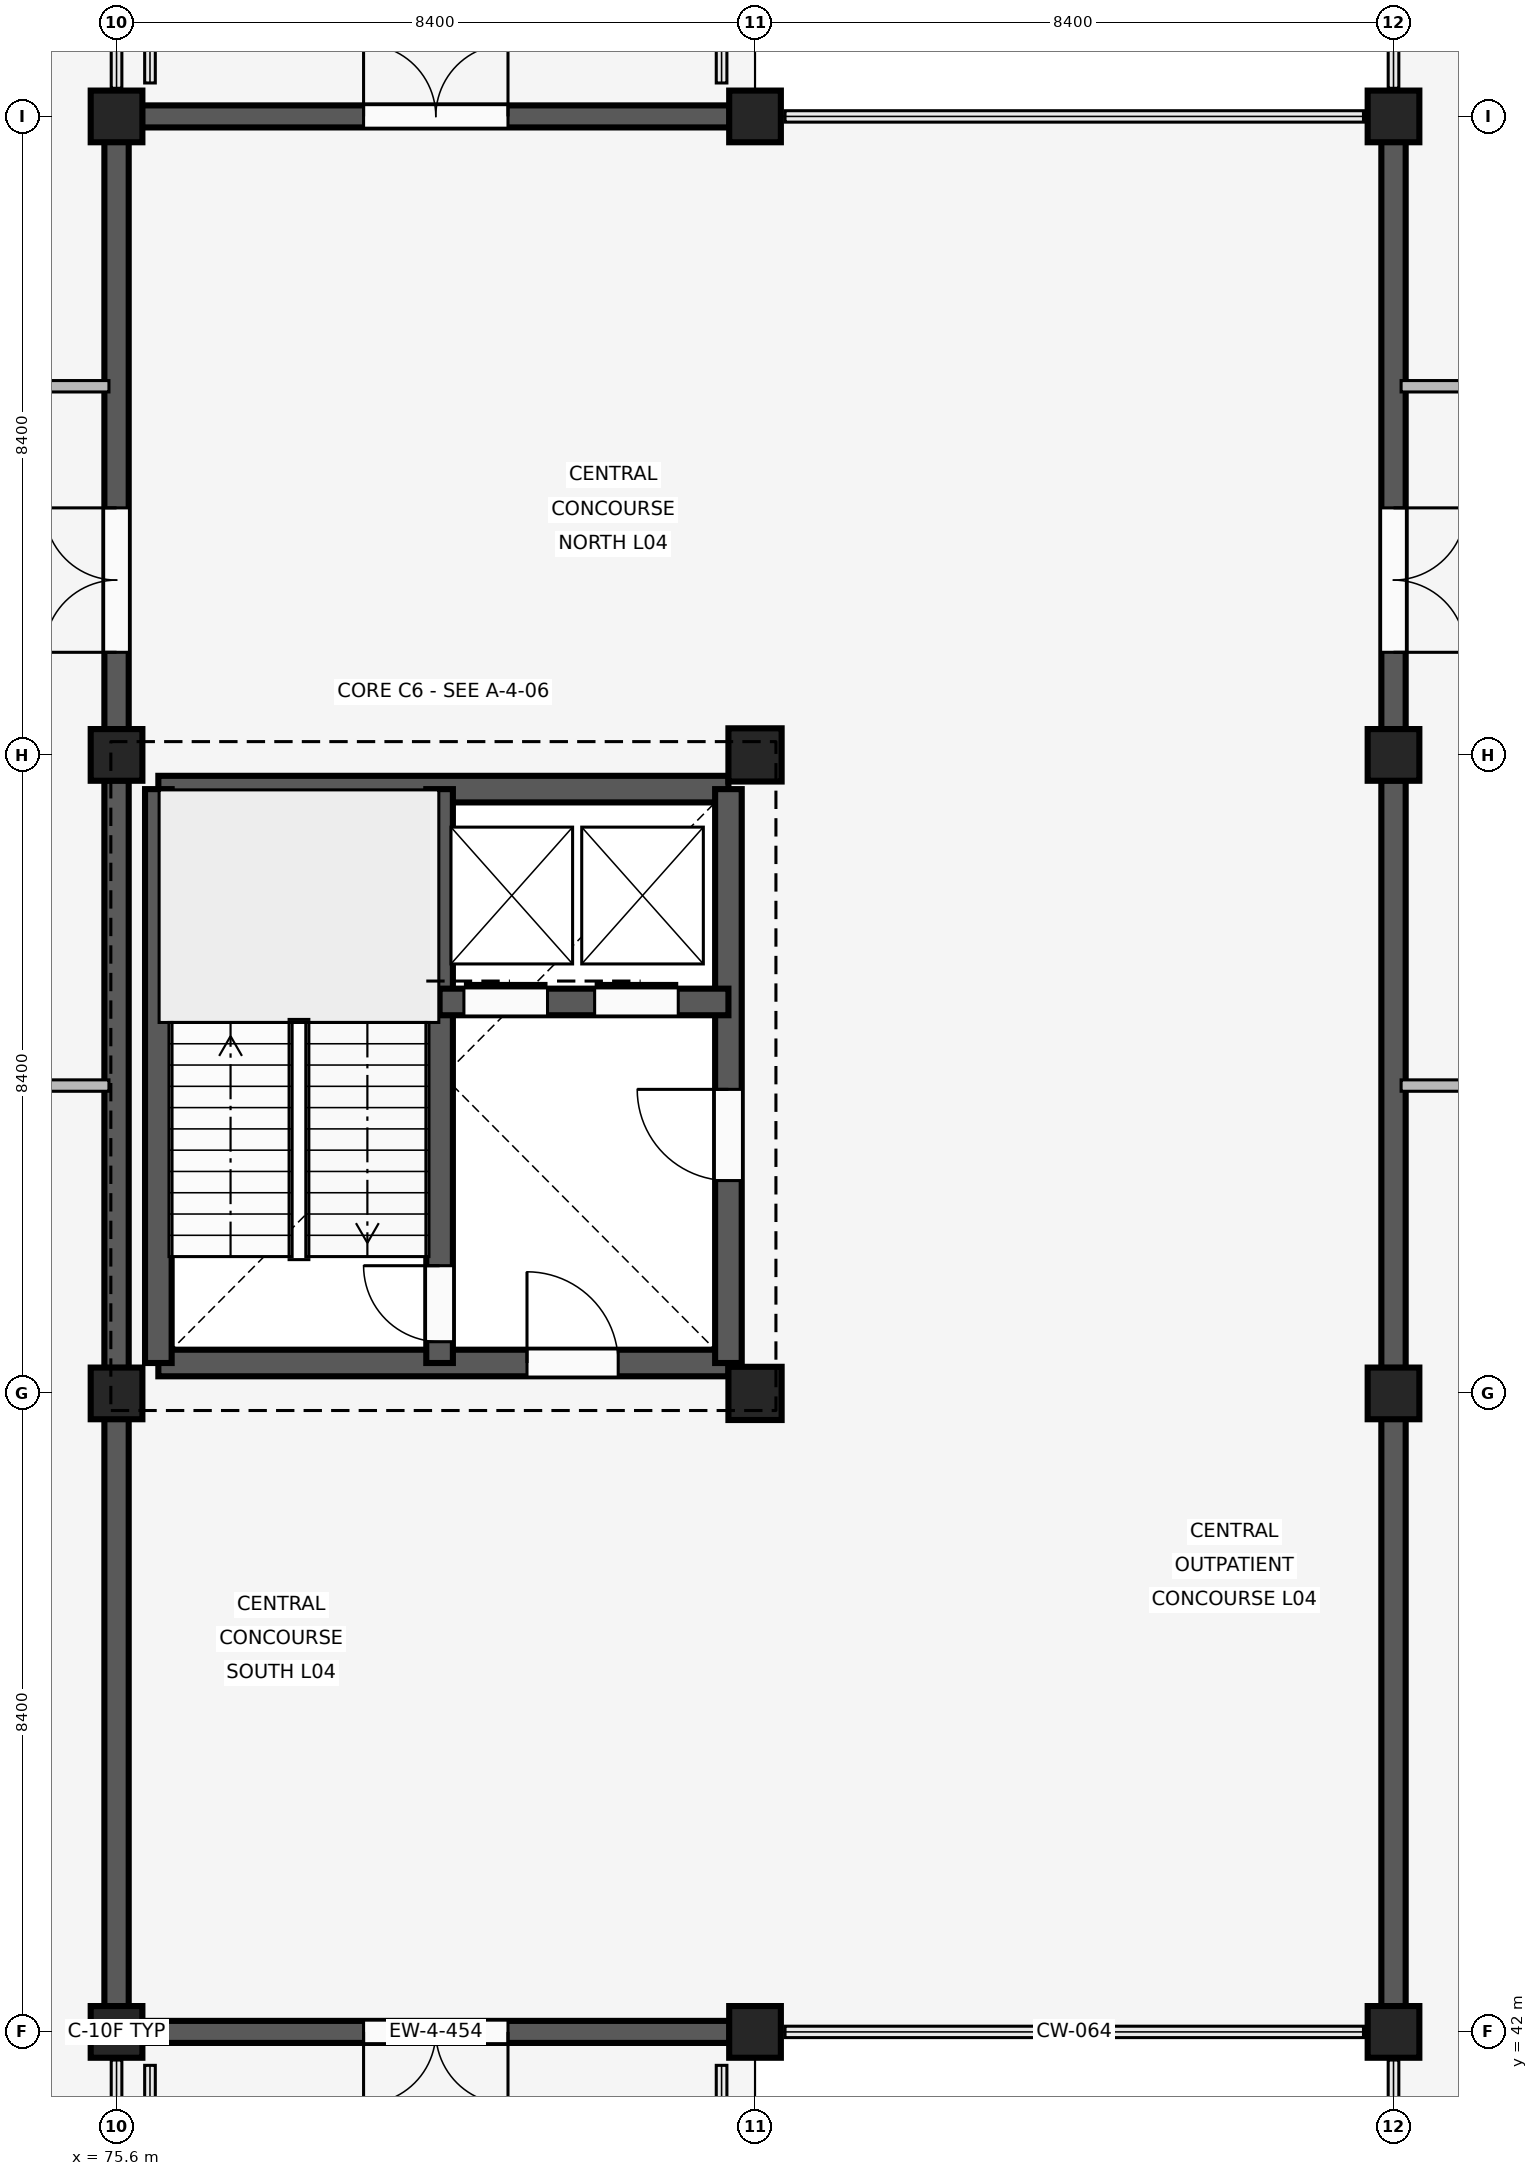
"""IFC4 building model, lengths in metres.
Left out: names, types, materials, properties, quantities, classifications, styles, units other than length and angle.
Written with IfcOpenShell. Run it as: python <this file> out.ifc"""

import sys

from ifc_helpers import new_model, si_unit, direction, frame, frame_2d, origin, origin_2d, place, context, subcontext, project, spatial, rectangle, extrude, element, fill, save


model = new_model("IFC4")
c1 = context("Model", 3, precision=1e-05, world=origin(), true_north=direction((0.0, 1.0)))
c2 = subcontext(c1, "Body", "Model", "MODEL_VIEW")
j1 = project(units=[si_unit("LENGTHUNIT", "METRE"), si_unit("PLANEANGLEUNIT", "RADIAN")], contexts=[c1])
p1 = place(None, origin())
s1 = spatial("IfcSite", under=j1, at=p1, CompositionType="ELEMENT")
p2 = place(p1, origin())
s2 = spatial("IfcBuilding", under=s1, at=p2, CompositionType="ELEMENT")
p3 = place(p2, frame((0.0, 0.0, 16.2)))
s3 = spatial("IfcBuildingStorey", under=s2, at=p3, CompositionType="ELEMENT", Elevation=16.2)
for number, where, z_axis, x_axis in (
    (1, (75.6, 42.0, 0.0), (0.0, 0.0, 1.0), (1.0, 0.0, 0.0)),
    (2, (75.6, 50.4, 0.0), (0.0, 0.0, 1.0), (1.0, 0.0, 0.0)),
    (3, (75.6, 58.8, 0.0), (0.0, 0.0, 1.0), (1.0, 0.0, 0.0)),
    (4, (75.6, 67.2, 0.0), (0.0, 0.0, 1.0), (1.0, 0.0, 0.0)),
    (5, (84.0, 42.0, 0.0), (0.0, 0.0, 1.0), (1.0, 0.0, 0.0)),
):
    element("IfcColumn", number, at=place(p3, frame(where, z_axis=z_axis, x_axis=x_axis)), inside=s3, PredefinedType="COLUMN", context=c2, shape_type="SweptSolid", body=[
        extrude(rectangle(XDim=0.68, YDim=0.68, at=origin_2d()), origin(), (0.0, 0.0, 1.0), 4.2),
    ])
for number, where, z_axis, x_axis in (
    (6, (84.0, 50.4, 0.0), (0.0, 0.0, 1.0), (1.0, 0.0, 0.0)),
    (7, (84.0, 58.8, 0.0), (0.0, 0.0, 1.0), (1.0, 0.0, 0.0)),
):
    element("IfcColumn", number, at=place(p3, frame(where, z_axis=z_axis, x_axis=x_axis)), inside=s3, PredefinedType="COLUMN", context=c2, shape_type="SweptSolid", body=[
        extrude(rectangle(XDim=0.7, YDim=0.7, at=origin_2d()), origin(), (0.0, 0.0, 1.0), 4.2),
    ])
for number, where, z_axis, x_axis in (
    (8, (84.0, 67.2, 0.0), (0.0, 0.0, 1.0), (1.0, 0.0, 0.0)),
    (9, (92.4, 42.0, 0.0), (0.0, 0.0, 1.0), (1.0, 0.0, 0.0)),
    (10, (92.4, 50.4, 0.0), (0.0, 0.0, 1.0), (1.0, 0.0, 0.0)),
    (11, (92.4, 58.8, 0.0), (0.0, 0.0, 1.0), (1.0, 0.0, 0.0)),
    (12, (92.4, 67.2, 0.0), (0.0, 0.0, 1.0), (1.0, 0.0, 0.0)),
):
    element("IfcColumn", number, at=place(p3, frame(where, z_axis=z_axis, x_axis=x_axis)), inside=s3, PredefinedType="COLUMN", context=c2, shape_type="SweptSolid", body=[
        extrude(rectangle(XDim=0.68, YDim=0.68, at=origin_2d()), origin(), (0.0, 0.0, 1.0), 4.2),
    ])
p4 = place(p3, frame((83.665, 42.0, 0.0), z_axis=(0.0, 0.0, 1.0), x_axis=(-1.0, 0.0, 0.0)))
e13 = element("IfcWall", 13, at=p4, inside=s3, PredefinedType="SOLIDWALL", context=c2, shape_type="SweptSolid", body=[
    extrude(rectangle(XDim=7.73, YDim=0.29, at=frame_2d((3.865, 0.0))), origin(), (0.0, 0.0, 1.0), 3.32),
])
p5 = place(p4, frame((2.915, 0.0, 0.0)))
e14 = element("IfcOpeningElement", 14, at=p5, cuts=e13, PredefinedType="OPENING", context=c2, shape_type="SweptSolid", body=[
    extrude(rectangle(XDim=1.9, YDim=2.4, at=frame_2d((0.95, 1.2))), frame((0.0, 0.155, 0.0), z_axis=(0.0, -1.0, 0.0), x_axis=(1.0, 0.0, 0.0)), (0.0, 0.0, 1.0), 0.31),
])
for number, where, z_axis, x_axis in (
    (15, (75.6, 42.335, 0.0), (0.0, 0.0, 1.0), (0.0, 1.0, 0.0)),
    (16, (75.6, 50.735, 0.0), (0.0, 0.0, 1.0), (0.0, 1.0, 0.0)),
):
    element("IfcWall", number, at=place(p3, frame(where, z_axis=z_axis, x_axis=x_axis)), inside=s3, PredefinedType="SOLIDWALL", context=c2, shape_type="SweptSolid", body=[
        extrude(rectangle(XDim=7.73, YDim=0.32, at=frame_2d((3.865, 0.0))), origin(), (0.0, 0.0, 1.0), 3.32),
    ])
p6 = place(p3, frame((75.935, 67.2, 0.0), z_axis=(0.0, 0.0, 1.0), x_axis=(1.0, 0.0, 0.0)))
e17 = element("IfcWall", 17, at=p6, inside=s3, PredefinedType="SOLIDWALL", context=c2, shape_type="SweptSolid", body=[
    extrude(rectangle(XDim=7.73, YDim=0.29, at=frame_2d((3.865, 0.0))), origin(), (0.0, 0.0, 1.0), 3.32),
])
p7 = place(p6, frame((2.915, 0.0, 0.0)))
e18 = element("IfcOpeningElement", 18, at=p7, cuts=e17, PredefinedType="OPENING", context=c2, shape_type="SweptSolid", body=[
    extrude(rectangle(XDim=1.9, YDim=2.4, at=frame_2d((0.95, 1.2))), frame((0.0, 0.155, 0.0), z_axis=(0.0, -1.0, 0.0), x_axis=(1.0, 0.0, 0.0)), (0.0, 0.0, 1.0), 0.31),
])
p8 = place(p3, frame((75.6, 59.135, 0.0), z_axis=(0.0, 0.0, 1.0), x_axis=(0.0, 1.0, 0.0)))
e19 = element("IfcWall", 19, at=p8, inside=s3, PredefinedType="SOLIDWALL", context=c2, shape_type="SweptSolid", body=[
    extrude(rectangle(XDim=7.73, YDim=0.32, at=frame_2d((3.865, 0.0))), origin(), (0.0, 0.0, 1.0), 3.32),
])
p9 = place(p8, frame((1.015, 0.0, 0.0)))
e20 = element("IfcOpeningElement", 20, at=p9, cuts=e19, PredefinedType="OPENING", context=c2, shape_type="SweptSolid", body=[
    extrude(rectangle(XDim=1.9, YDim=2.4, at=frame_2d((0.95, 1.2))), frame((0.0, 0.17, 0.0), z_axis=(0.0, -1.0, 0.0), x_axis=(1.0, 0.0, 0.0)), (0.0, 0.0, 1.0), 0.34),
])
for number, where, z_axis, x_axis in (
    (21, (92.4, 50.065, 0.0), (0.0, 0.0, 1.0), (0.0, -1.0, 0.0)),
    (22, (92.4, 58.465, 0.0), (0.0, 0.0, 1.0), (0.0, -1.0, 0.0)),
):
    element("IfcWall", number, at=place(p3, frame(where, z_axis=z_axis, x_axis=x_axis)), inside=s3, PredefinedType="SOLIDWALL", context=c2, shape_type="SweptSolid", body=[
        extrude(rectangle(XDim=7.73, YDim=0.32, at=frame_2d((3.865, 0.0))), origin(), (0.0, 0.0, 1.0), 3.32),
    ])
p10 = place(p3, frame((92.4, 66.865, 0.0), z_axis=(0.0, 0.0, 1.0), x_axis=(0.0, -1.0, 0.0)))
e23 = element("IfcWall", 23, at=p10, inside=s3, PredefinedType="SOLIDWALL", context=c2, shape_type="SweptSolid", body=[
    extrude(rectangle(XDim=7.73, YDim=0.32, at=frame_2d((3.865, 0.0))), origin(), (0.0, 0.0, 1.0), 3.32),
])
p11 = place(p10, frame((4.815, 0.0, 0.0)))
e24 = element("IfcOpeningElement", 24, at=p11, cuts=e23, PredefinedType="OPENING", context=c2, shape_type="SweptSolid", body=[
    extrude(rectangle(XDim=1.9, YDim=2.4, at=frame_2d((0.95, 1.2))), frame((0.0, 0.17, 0.0), z_axis=(0.0, -1.0, 0.0), x_axis=(1.0, 0.0, 0.0)), (0.0, 0.0, 1.0), 0.34),
])
p12 = place(p3, frame((76.15, 50.8, 0.0), z_axis=(0.0, 0.0, 1.0), x_axis=(1.0, 0.0, 0.0)))
e25 = element("IfcWall", 25, at=p12, inside=s3, PredefinedType="SHEAR", context=c2, shape_type="SweptSolid", body=[
    extrude(rectangle(XDim=7.5, YDim=0.35, at=frame_2d((3.75, 0.0))), origin(), (0.0, 0.0, 1.0), 3.92),
])
p13 = place(p12, frame((4.85, 0.0, 0.0)))
e26 = element("IfcOpeningElement", 26, at=p13, cuts=e25, PredefinedType="OPENING", context=c2, shape_type="SweptSolid", body=[
    extrude(rectangle(XDim=1.2, YDim=2.2, at=frame_2d((0.6, 1.1))), frame((0.0, 0.185, 0.0), z_axis=(0.0, -1.0, 0.0), x_axis=(1.0, 0.0, 0.0)), (0.0, 0.0, 1.0), 0.37),
])
p14 = place(p3, frame((76.15, 58.35, 0.0), z_axis=(0.0, 0.0, 1.0), x_axis=(1.0, 0.0, 0.0)))
e27 = element("IfcWall", 27, at=p14, inside=s3, PredefinedType="SHEAR", context=c2, shape_type="SweptSolid", body=[
    extrude(rectangle(XDim=7.5, YDim=0.35, at=frame_2d((3.75, 0.0))), origin(), (0.0, 0.0, 1.0), 3.92),
])
p15 = place(p3, frame((76.15, 50.8, 0.0), z_axis=(0.0, 0.0, 1.0), x_axis=(0.0, 1.0, 0.0)))
e28 = element("IfcWall", 28, at=p15, inside=s3, PredefinedType="SHEAR", context=c2, shape_type="SweptSolid", body=[
    extrude(rectangle(XDim=7.55, YDim=0.35, at=frame_2d((3.775, 0.0))), origin(), (0.0, 0.0, 1.0), 3.92),
])
p16 = place(p3, frame((83.65, 50.8, 0.0), z_axis=(0.0, 0.0, 1.0), x_axis=(0.0, 1.0, 0.0)))
e29 = element("IfcWall", 29, at=p16, inside=s3, PredefinedType="SHEAR", context=c2, shape_type="SweptSolid", body=[
    extrude(rectangle(XDim=7.55, YDim=0.35, at=frame_2d((3.775, 0.0))), origin(), (0.0, 0.0, 1.0), 3.92),
])
p17 = place(p16, frame((2.4, 0.0, 0.0)))
e30 = element("IfcOpeningElement", 30, at=p17, cuts=e29, PredefinedType="OPENING", context=c2, shape_type="SweptSolid", body=[
    extrude(rectangle(XDim=1.2, YDim=2.2, at=frame_2d((0.6, 1.1))), frame((0.0, 0.185, 0.0), z_axis=(0.0, -1.0, 0.0), x_axis=(1.0, 0.0, 0.0)), (0.0, 0.0, 1.0), 0.37),
])
p18 = place(p3, frame((79.85, 50.8, 0.0), z_axis=(0.0, 0.0, 1.0), x_axis=(0.0, 1.0, 0.0)))
e31 = element("IfcWall", 31, at=p18, inside=s3, PredefinedType="SHEAR", context=c2, shape_type="SweptSolid", body=[
    extrude(rectangle(XDim=7.55, YDim=0.35, at=frame_2d((3.775, 0.0))), origin(), (0.0, 0.0, 1.0), 3.92),
])
p19 = place(p18, frame((0.28, 0.0, 0.0)))
e32 = element("IfcOpeningElement", 32, at=p19, cuts=e31, PredefinedType="OPENING", context=c2, shape_type="SweptSolid", body=[
    extrude(rectangle(XDim=1.0, YDim=2.15, at=frame_2d((0.5, 1.075))), frame((0.0, 0.185, 0.0), z_axis=(0.0, -1.0, 0.0), x_axis=(1.0, 0.0, 0.0)), (0.0, 0.0, 1.0), 0.37),
])
p20 = place(p3, frame((79.85, 55.55, 0.0), z_axis=(0.0, 0.0, 1.0), x_axis=(1.0, 0.0, 0.0)))
e33 = element("IfcWall", 33, at=p20, inside=s3, PredefinedType="SHEAR", context=c2, shape_type="SweptSolid", body=[
    extrude(rectangle(XDim=3.8, YDim=0.35, at=frame_2d((1.9, 0.0))), origin(), (0.0, 0.0, 1.0), 3.92),
])
p21 = place(p20, frame((0.32, 0.0, 0.0)))
e34 = element("IfcOpeningElement", 34, at=p21, cuts=e33, PredefinedType="OPENING", context=c2, shape_type="SweptSolid", body=[
    extrude(rectangle(XDim=1.1, YDim=2.15, at=frame_2d((0.55, 1.075))), frame((0.0, 0.185, 0.0), z_axis=(0.0, -1.0, 0.0), x_axis=(1.0, 0.0, 0.0)), (0.0, 0.0, 1.0), 0.37),
])
p22 = place(p20, frame((2.04, 0.0, 0.0)))
e35 = element("IfcOpeningElement", 35, at=p22, cuts=e33, PredefinedType="OPENING", context=c2, shape_type="SweptSolid", body=[
    extrude(rectangle(XDim=1.1, YDim=2.15, at=frame_2d((0.55, 1.075))), frame((0.0, 0.185, 0.0), z_axis=(0.0, -1.0, 0.0), x_axis=(1.0, 0.0, 0.0)), (0.0, 0.0, 1.0), 0.37),
])
p23 = place(p3, frame((53.3, 54.45, 0.0), z_axis=(0.0, 0.0, 1.0), x_axis=(1.0, 0.0, 0.0)))
e36 = element("IfcWall", 36, at=p23, inside=s3, PredefinedType="PARTITIONING", context=c2, shape_type="SweptSolid", body=[
    extrude(rectangle(XDim=22.2, YDim=0.15, at=frame_2d((11.1, 0.0))), origin(), (0.0, 0.0, 1.0), 3.49),
])
p24 = place(p23, frame((2.6, 0.0, 0.0)))
e37 = element("IfcOpeningElement", 37, at=p24, cuts=e36, PredefinedType="OPENING", context=c2, shape_type="SweptSolid", body=[
    extrude(rectangle(XDim=1.0, YDim=2.15, at=frame_2d((0.5, 1.075))), frame((0.0, 0.085, 0.0), z_axis=(0.0, -1.0, 0.0), x_axis=(1.0, 0.0, 0.0)), (0.0, 0.0, 1.0), 0.17),
])
p25 = place(p3, frame((53.3, 63.65, 0.0), z_axis=(0.0, 0.0, 1.0), x_axis=(1.0, 0.0, 0.0)))
e38 = element("IfcWall", 38, at=p25, inside=s3, PredefinedType="PARTITIONING", context=c2, shape_type="SweptSolid", body=[
    extrude(rectangle(XDim=22.2, YDim=0.15, at=frame_2d((11.1, 0.0))), origin(), (0.0, 0.0, 1.0), 3.49),
])
p26 = place(p25, frame((2.6, 0.0, 0.0)))
e39 = element("IfcOpeningElement", 39, at=p26, cuts=e38, PredefinedType="OPENING", context=c2, shape_type="SweptSolid", body=[
    extrude(rectangle(XDim=1.05, YDim=2.2, at=frame_2d((0.525, 1.1))), frame((0.0, 0.085, 0.0), z_axis=(0.0, -1.0, 0.0), x_axis=(1.0, 0.0, 0.0)), (0.0, 0.0, 1.0), 0.17),
])
p27 = place(p3, frame((92.5, 54.45, 0.0), z_axis=(0.0, 0.0, 1.0), x_axis=(1.0, 0.0, 0.0)))
e40 = element("IfcWall", 40, at=p27, inside=s3, PredefinedType="PARTITIONING", context=c2, shape_type="SweptSolid", body=[
    extrude(rectangle(XDim=22.2, YDim=0.15, at=frame_2d((11.1, 0.0))), origin(), (0.0, 0.0, 1.0), 3.49),
])
p28 = place(p27, frame((2.6, 0.0, 0.0)))
e41 = element("IfcOpeningElement", 41, at=p28, cuts=e40, PredefinedType="OPENING", context=c2, shape_type="SweptSolid", body=[
    extrude(rectangle(XDim=1.0, YDim=2.15, at=frame_2d((0.5, 1.075))), frame((0.0, 0.085, 0.0), z_axis=(0.0, -1.0, 0.0), x_axis=(1.0, 0.0, 0.0)), (0.0, 0.0, 1.0), 0.17),
])
p29 = place(p3, frame((92.5, 63.65, 0.0), z_axis=(0.0, 0.0, 1.0), x_axis=(1.0, 0.0, 0.0)))
e42 = element("IfcWall", 42, at=p29, inside=s3, PredefinedType="PARTITIONING", context=c2, shape_type="SweptSolid", body=[
    extrude(rectangle(XDim=22.2, YDim=0.15, at=frame_2d((11.1, 0.0))), origin(), (0.0, 0.0, 1.0), 3.49),
])
p30 = place(p29, frame((2.6, 0.0, 0.0)))
e43 = element("IfcOpeningElement", 43, at=p30, cuts=e42, PredefinedType="OPENING", context=c2, shape_type="SweptSolid", body=[
    extrude(rectangle(XDim=1.05, YDim=2.2, at=frame_2d((0.525, 1.1))), frame((0.0, 0.085, 0.0), z_axis=(0.0, -1.0, 0.0), x_axis=(1.0, 0.0, 0.0)), (0.0, 0.0, 1.0), 0.17),
])
p31 = place(p5, origin())
e44 = element("IfcDoor", 44, at=p31, inside=s3, OperationType="DOUBLE_SWING_LEFT", PredefinedType="DOOR", context=c2, shape_type="SweptSolid", body=[
    extrude(rectangle(XDim=1.9, YDim=2.4, at=frame_2d((0.95, 1.2))), frame((0.0, 0.025, 0.0), z_axis=(0.0, -1.0, 0.0), x_axis=(1.0, 0.0, 0.0)), (0.0, 0.0, 1.0), 0.05),
])
fill(e14, e44)
p32 = place(p7, origin())
e45 = element("IfcDoor", 45, at=p32, inside=s3, OperationType="DOUBLE_SWING_LEFT", PredefinedType="DOOR", context=c2, shape_type="SweptSolid", body=[
    extrude(rectangle(XDim=1.9, YDim=2.4, at=frame_2d((0.95, 1.2))), frame((0.0, 0.025, 0.0), z_axis=(0.0, -1.0, 0.0), x_axis=(1.0, 0.0, 0.0)), (0.0, 0.0, 1.0), 0.05),
])
fill(e18, e45)
p33 = place(p9, origin())
e46 = element("IfcDoor", 46, at=p33, inside=s3, OperationType="DOUBLE_SWING_LEFT", PredefinedType="DOOR", context=c2, shape_type="SweptSolid", body=[
    extrude(rectangle(XDim=1.9, YDim=2.4, at=frame_2d((0.95, 1.2))), frame((0.0, 0.025, 0.0), z_axis=(0.0, -1.0, 0.0), x_axis=(1.0, 0.0, 0.0)), (0.0, 0.0, 1.0), 0.05),
])
fill(e20, e46)
p34 = place(p11, origin())
e47 = element("IfcDoor", 47, at=p34, inside=s3, OperationType="DOUBLE_SWING_LEFT", PredefinedType="DOOR", context=c2, shape_type="SweptSolid", body=[
    extrude(rectangle(XDim=1.9, YDim=2.4, at=frame_2d((0.95, 1.2))), frame((0.0, 0.025, 0.0), z_axis=(0.0, -1.0, 0.0), x_axis=(1.0, 0.0, 0.0)), (0.0, 0.0, 1.0), 0.05),
])
fill(e24, e47)
p35 = place(p17, origin())
e48 = element("IfcDoor", 48, at=p35, inside=s3, OperationType="SINGLE_SWING_RIGHT", PredefinedType="DOOR", context=c2, shape_type="SweptSolid", body=[
    extrude(rectangle(XDim=1.2, YDim=2.2, at=frame_2d((0.6, 1.1))), frame((0.0, 0.025, 0.0), z_axis=(0.0, -1.0, 0.0), x_axis=(1.0, 0.0, 0.0)), (0.0, 0.0, 1.0), 0.05),
])
fill(e30, e48)
p36 = place(p13, origin())
e49 = element("IfcDoor", 49, at=p36, inside=s3, OperationType="SINGLE_SWING_LEFT", PredefinedType="DOOR", context=c2, shape_type="SweptSolid", body=[
    extrude(rectangle(XDim=1.2, YDim=2.2, at=frame_2d((0.6, 1.1))), frame((0.0, 0.025, 0.0), z_axis=(0.0, -1.0, 0.0), x_axis=(1.0, 0.0, 0.0)), (0.0, 0.0, 1.0), 0.05),
])
fill(e26, e49)
p37 = place(p19, origin())
e50 = element("IfcDoor", 50, at=p37, inside=s3, OperationType="SINGLE_SWING_RIGHT", PredefinedType="DOOR", context=c2, shape_type="SweptSolid", body=[
    extrude(rectangle(XDim=1.0, YDim=2.15, at=frame_2d((0.5, 1.075))), frame((0.0, 0.025, 0.0), z_axis=(0.0, -1.0, 0.0), x_axis=(1.0, 0.0, 0.0)), (0.0, 0.0, 1.0), 0.05),
])
fill(e32, e50)
p38 = place(p21, origin())
e51 = element("IfcDoor", 51, at=p38, inside=s3, OperationType="SLIDING_TO_LEFT", PredefinedType="DOOR", context=c2, shape_type="SweptSolid", body=[
    extrude(rectangle(XDim=1.1, YDim=2.15, at=frame_2d((0.55, 1.075))), frame((0.0, 0.025, 0.0), z_axis=(0.0, -1.0, 0.0), x_axis=(1.0, 0.0, 0.0)), (0.0, 0.0, 1.0), 0.05),
])
fill(e34, e51)
p39 = place(p22, origin())
e52 = element("IfcDoor", 52, at=p39, inside=s3, OperationType="SLIDING_TO_LEFT", PredefinedType="DOOR", context=c2, shape_type="SweptSolid", body=[
    extrude(rectangle(XDim=1.1, YDim=2.15, at=frame_2d((0.55, 1.075))), frame((0.0, 0.025, 0.0), z_axis=(0.0, -1.0, 0.0), x_axis=(1.0, 0.0, 0.0)), (0.0, 0.0, 1.0), 0.05),
])
fill(e35, e52)
save(model, sys.argv[1])
